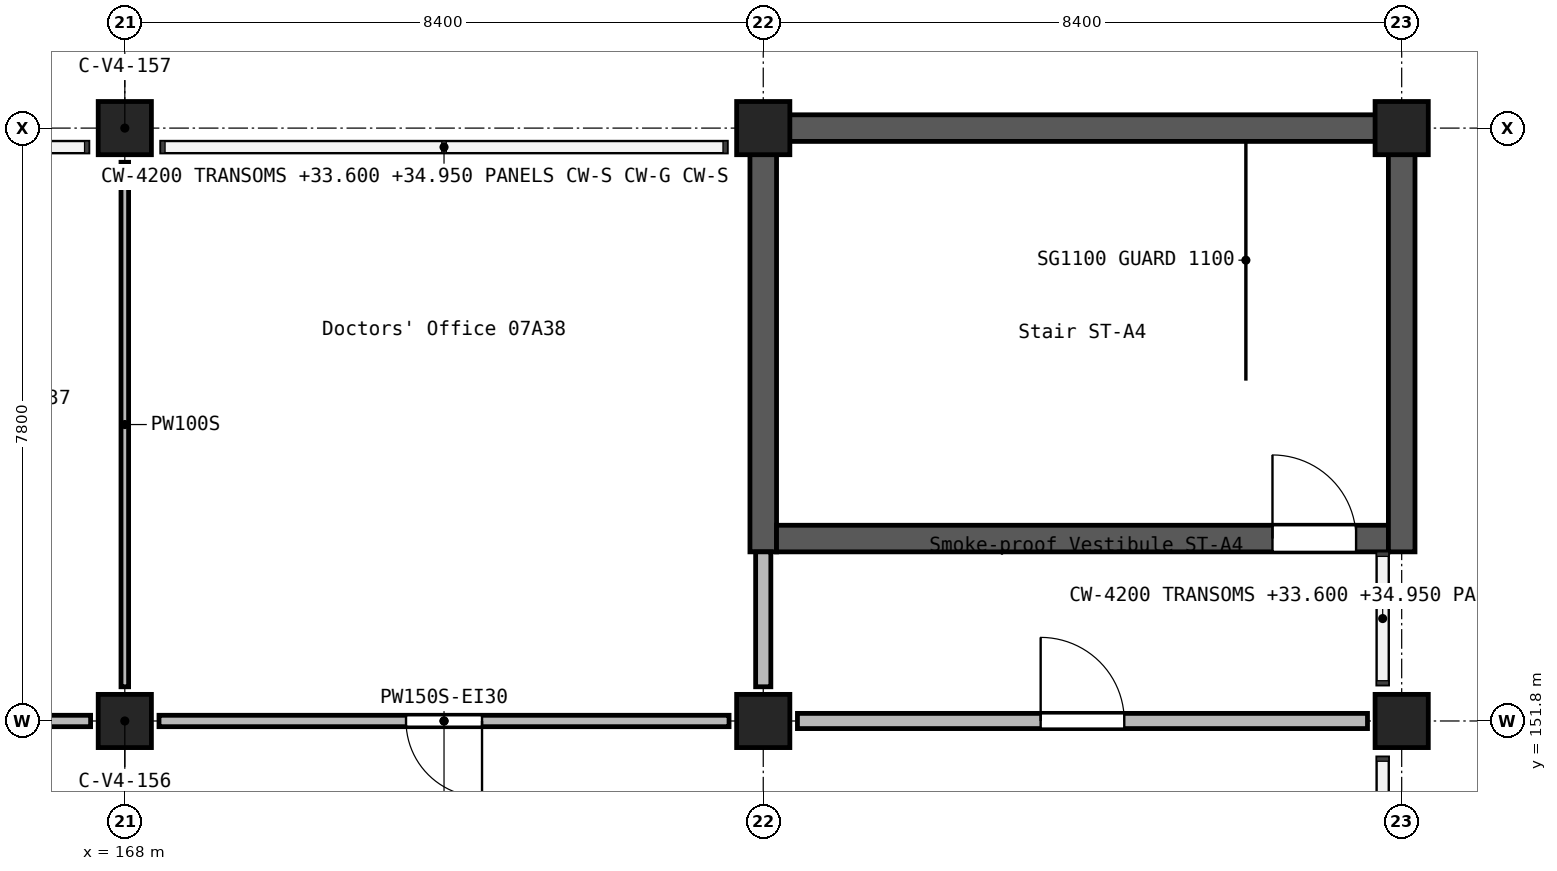
"""IFC4 building model, lengths in metres.
Left out: names, types, materials, properties, quantities, classifications, styles, units other than length and angle.
Written with IfcOpenShell. Run it as: python <this file> out.ifc"""

import sys

from ifc_helpers import new_model, si_unit, direction, frame, frame_2d, origin, origin_2d, place, context, subcontext, project, spatial, rectangle, extrude, element, fill, save


model = new_model("IFC4")
c1 = context("Model", 3, precision=1e-05, world=origin(), true_north=direction((0.0, 1.0)))
c2 = subcontext(c1, "Body", "Model", "MODEL_VIEW")
j1 = project(units=[si_unit("LENGTHUNIT", "METRE"), si_unit("PLANEANGLEUNIT", "RADIAN")], contexts=[c1])
p1 = place(None, origin())
s1 = spatial("IfcSite", under=j1, at=p1, CompositionType="ELEMENT")
p2 = place(p1, origin())
s2 = spatial("IfcBuilding", under=s1, at=p2, CompositionType="ELEMENT")
p3 = place(p2, frame((0.0, 0.0, 32.7)))
s3 = spatial("IfcBuildingStorey", under=s2, at=p3, CompositionType="ELEMENT", Elevation=32.7)
for number, where, z_axis, x_axis in (
    (1, (168.0, 151.8, 0.0), (0.0, 0.0, 1.0), (1.0, 0.0, 0.0)),
    (2, (168.0, 159.6, 0.0), (0.0, 0.0, 1.0), (1.0, 0.0, 0.0)),
    (3, (176.4, 151.8, 0.0), (0.0, 0.0, 1.0), (1.0, 0.0, 0.0)),
    (4, (176.4, 159.6, 0.0), (0.0, 0.0, 1.0), (1.0, 0.0, 0.0)),
    (5, (184.8, 151.8, 0.0), (0.0, 0.0, 1.0), (1.0, 0.0, 0.0)),
    (6, (184.8, 159.6, 0.0), (0.0, 0.0, 1.0), (1.0, 0.0, 0.0)),
):
    element("IfcColumn", number, at=place(p3, frame(where, z_axis=z_axis, x_axis=x_axis)), inside=s3, PredefinedType="COLUMN", context=c2, shape_type="SweptSolid", body=[
        extrude(rectangle(XDim=0.7, YDim=0.7, at=origin_2d()), origin(), (0.0, 0.0, 1.0), 3.9),
    ])
p4 = place(p3, frame((176.225, 159.6, 0.0), z_axis=(0.0, 0.0, 1.0), x_axis=(1.0, 0.0, 0.0)))
e7 = element("IfcWall", 7, at=p4, inside=s3, PredefinedType="SHEAR", context=c2, shape_type="SweptSolid", body=[
    extrude(rectangle(XDim=8.4, YDim=0.35, at=frame_2d((4.2, 0.0))), origin(), (0.0, 0.0, 1.0), 3.9),
])
p5 = place(p3, frame((176.4, 154.025, 0.0), z_axis=(0.0, 0.0, 1.0), x_axis=(0.0, 1.0, 0.0)))
e8 = element("IfcWall", 8, at=p5, inside=s3, PredefinedType="SHEAR", context=c2, shape_type="SweptSolid", body=[
    extrude(rectangle(XDim=5.4, YDim=0.35, at=frame_2d((2.7, 0.0))), origin(), (0.0, 0.0, 1.0), 3.9),
])
p6 = place(p3, frame((176.575, 154.2, 0.0), z_axis=(0.0, 0.0, 1.0), x_axis=(1.0, 0.0, 0.0)))
e9 = element("IfcWall", 9, at=p6, inside=s3, PredefinedType="SHEAR", context=c2, shape_type="SweptSolid", body=[
    extrude(rectangle(XDim=8.05, YDim=0.35, at=frame_2d((4.025, 0.0))), origin(), (0.0, 0.0, 1.0), 3.9),
])
p7 = place(p6, frame((6.525, 0.0, 0.0)))
e10 = element("IfcOpeningElement", 10, at=p7, cuts=e9, PredefinedType="OPENING", context=c2, shape_type="SweptSolid", body=[
    extrude(rectangle(XDim=1.1, YDim=2.1, at=frame_2d((0.55, 1.05))), frame((0.0, 0.185, 0.0), z_axis=(0.0, -1.0, 0.0), x_axis=(1.0, 0.0, 0.0)), (0.0, 0.0, 1.0), 0.37),
])
p8 = place(p3, frame((184.8, 154.025, 0.0), z_axis=(0.0, 0.0, 1.0), x_axis=(0.0, 1.0, 0.0)))
e11 = element("IfcWall", 11, at=p8, inside=s3, PredefinedType="SHEAR", context=c2, shape_type="SweptSolid", body=[
    extrude(rectangle(XDim=5.75, YDim=0.35, at=frame_2d((2.875, 0.0))), origin(), (0.0, 0.0, 1.0), 3.9),
])
p9 = place(p3, frame((176.85, 151.8, 0.0), z_axis=(0.0, 0.0, 1.0), x_axis=(1.0, 0.0, 0.0)))
e12 = element("IfcWall", 12, at=p9, inside=s3, PredefinedType="SOLIDWALL", context=c2, shape_type="SweptSolid", body=[
    extrude(rectangle(XDim=7.5, YDim=0.2, at=frame_2d((3.75, 0.0))), origin(), (0.0, 0.0, 1.0), 3.6),
])
p10 = place(p9, frame((3.2, 0.0, 0.0)))
e13 = element("IfcOpeningElement", 13, at=p10, cuts=e12, PredefinedType="OPENING", context=c2, shape_type="SweptSolid", body=[
    extrude(rectangle(XDim=1.1, YDim=2.1, at=frame_2d((0.55, 1.05))), frame((0.0, 0.11, 0.0), z_axis=(0.0, -1.0, 0.0), x_axis=(1.0, 0.0, 0.0)), (0.0, 0.0, 1.0), 0.22),
])
p11 = place(p3, frame((176.4, 152.25, 0.0), z_axis=(0.0, 0.0, 1.0), x_axis=(0.0, 1.0, 0.0)))
e14 = element("IfcWall", 14, at=p11, inside=s3, PredefinedType="SOLIDWALL", context=c2, shape_type="SweptSolid", body=[
    extrude(rectangle(XDim=1.775, YDim=0.2, at=frame_2d((0.887, 0.0))), origin(), (0.0, 0.0, 1.0), 3.6),
])
p12 = place(p3, frame((175.95, 151.8, 0.0), z_axis=(0.0, 0.0, 1.0), x_axis=(-1.0, 0.0, 0.0)))
e15 = element("IfcWall", 15, at=p12, inside=s3, PredefinedType="PARTITIONING", context=c2, shape_type="SweptSolid", body=[
    extrude(rectangle(XDim=7.5, YDim=0.15, at=frame_2d((3.75, 0.0))), origin(), (0.0, 0.0, 1.0), 3.6),
])
p13 = place(p12, frame((3.25, 0.0, 0.0)))
e16 = element("IfcOpeningElement", 16, at=p13, cuts=e15, PredefinedType="OPENING", context=c2, shape_type="SweptSolid", body=[
    extrude(rectangle(XDim=1.0, YDim=2.1, at=frame_2d((0.5, 1.05))), frame((0.0, 0.085, 0.0), z_axis=(0.0, -1.0, 0.0), x_axis=(1.0, 0.0, 0.0)), (0.0, 0.0, 1.0), 0.17),
])
p14 = place(p3, frame((167.55, 151.8, 0.0), z_axis=(0.0, 0.0, 1.0), x_axis=(-1.0, 0.0, 0.0)))
e17 = element("IfcWall", 17, at=p14, inside=s3, PredefinedType="PARTITIONING", context=c2, shape_type="SweptSolid", body=[
    extrude(rectangle(XDim=7.5, YDim=0.15, at=frame_2d((3.75, 0.0))), origin(), (0.0, 0.0, 1.0), 3.6),
])
p15 = place(p14, frame((4.15, 0.0, 0.0)))
e18 = element("IfcOpeningElement", 18, at=p15, cuts=e17, PredefinedType="OPENING", context=c2, shape_type="SweptSolid", body=[
    extrude(rectangle(XDim=1.0, YDim=2.1, at=frame_2d((0.5, 1.05))), frame((0.0, 0.085, 0.0), z_axis=(0.0, -1.0, 0.0), x_axis=(1.0, 0.0, 0.0)), (0.0, 0.0, 1.0), 0.17),
])
p16 = place(p14, frame((1.15, 0.0, 0.0)))
e19 = element("IfcOpeningElement", 19, at=p16, cuts=e17, PredefinedType="OPENING", context=c2, shape_type="SweptSolid", body=[
    extrude(rectangle(XDim=1.0, YDim=2.1, at=frame_2d((0.5, 1.05))), frame((0.0, 0.085, 0.0), z_axis=(0.0, -1.0, 0.0), x_axis=(1.0, 0.0, 0.0)), (0.0, 0.0, 1.0), 0.17),
])
p17 = place(p3, frame((168.0, 152.25, 0.0), z_axis=(0.0, 0.0, 1.0), x_axis=(0.0, 1.0, 0.0)))
e20 = element("IfcWall", 20, at=p17, inside=s3, PredefinedType="PARTITIONING", context=c2, shape_type="SweptSolid", body=[
    extrude(rectangle(XDim=6.9, YDim=0.1, at=frame_2d((3.45, 0.0))), origin(), (0.0, 0.0, 1.0), 3.6),
])
p18 = place(p13, frame((1.0, 0.0, 0.0), z_axis=(0.0, 0.0, 1.0), x_axis=(-1.0, 0.0, 0.0)))
e21 = element("IfcDoor", 21, at=p18, inside=s3, OperationType="SINGLE_SWING_RIGHT", PredefinedType="DOOR", context=c2, shape_type="SweptSolid", body=[
    extrude(rectangle(XDim=1.0, YDim=2.1, at=frame_2d((0.5, 1.05))), frame((0.0, 0.025, 0.0), z_axis=(0.0, -1.0, 0.0), x_axis=(1.0, 0.0, 0.0)), (0.0, 0.0, 1.0), 0.05),
])
fill(e16, e21)
p19 = place(p7, origin())
e22 = element("IfcDoor", 22, at=p19, inside=s3, OperationType="SINGLE_SWING_RIGHT", PredefinedType="DOOR", context=c2, shape_type="SweptSolid", body=[
    extrude(rectangle(XDim=1.1, YDim=2.1, at=frame_2d((0.55, 1.05))), frame((0.0, 0.025, 0.0), z_axis=(0.0, -1.0, 0.0), x_axis=(1.0, 0.0, 0.0)), (0.0, 0.0, 1.0), 0.05),
])
fill(e10, e22)
p20 = place(p10, origin())
e23 = element("IfcDoor", 23, at=p20, inside=s3, OperationType="SINGLE_SWING_RIGHT", PredefinedType="DOOR", context=c2, shape_type="SweptSolid", body=[
    extrude(rectangle(XDim=1.1, YDim=2.1, at=frame_2d((0.55, 1.05))), frame((0.0, 0.025, 0.0), z_axis=(0.0, -1.0, 0.0), x_axis=(1.0, 0.0, 0.0)), (0.0, 0.0, 1.0), 0.05),
])
fill(e13, e23)
save(model, sys.argv[1])
